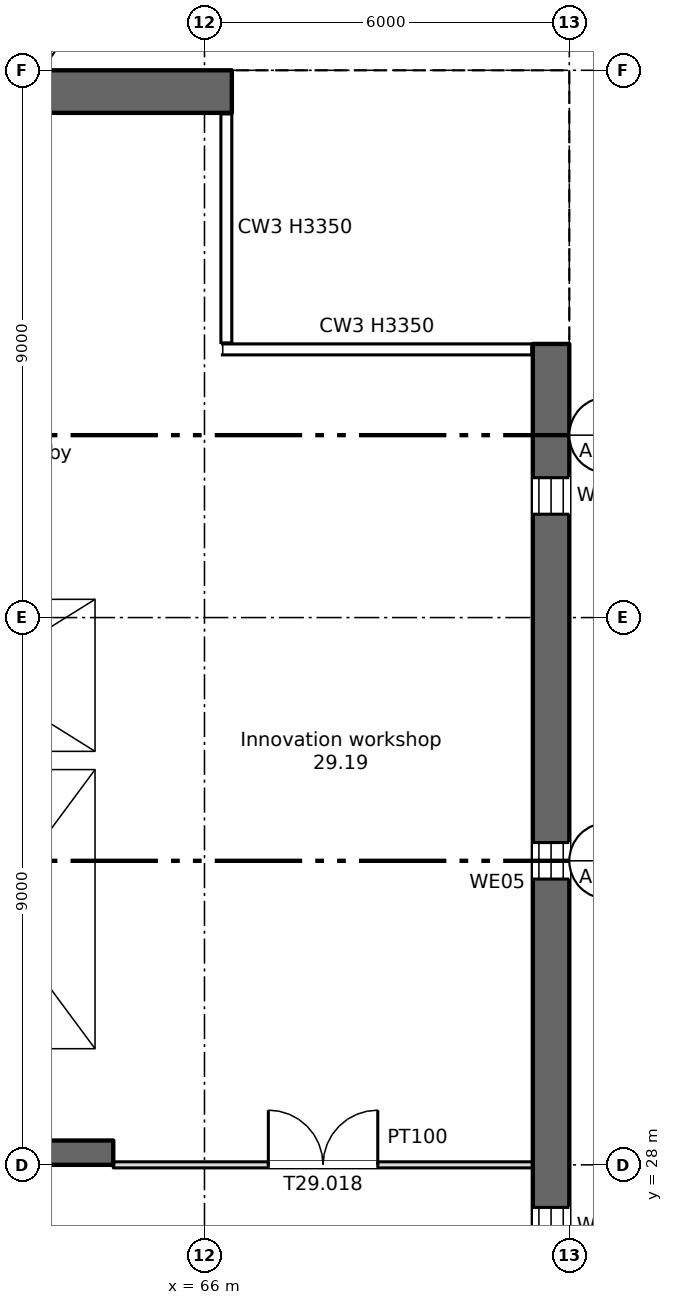
"""IFC4 building model, lengths in metres.
Left out: names, types, materials, properties, quantities, classifications, styles, units other than length and angle.
Written with IfcOpenShell. Run it as: python <this file> out.ifc"""

import sys

from ifc_helpers import new_model, si_unit, direction, frame, frame_2d, origin, place, context, subcontext, project, spatial, rectangle, extrude, element, fill, save


model = new_model("IFC4")
c1 = context("Model", 3, precision=1e-05, world=origin(), true_north=direction((0.0, 1.0)))
c2 = subcontext(c1, "Body", "Model", "MODEL_VIEW")
j1 = project(units=[si_unit("LENGTHUNIT", "METRE"), si_unit("PLANEANGLEUNIT", "RADIAN")], contexts=[c1])
p1 = place(None, origin())
s1 = spatial("IfcSite", under=j1, at=p1, CompositionType="ELEMENT")
p2 = place(p1, origin())
s2 = spatial("IfcBuilding", under=s1, at=p2, CompositionType="ELEMENT")
p3 = place(p2, frame((0.0, 0.0, 200.5)))
s3 = spatial("IfcBuildingStorey", under=s2, at=p3, CompositionType="ELEMENT", Elevation=200.5)
p4 = place(p3, frame((71.7, 7.5, 0.0), z_axis=(0.0, 0.0, 1.0), x_axis=(0.0, 1.0, 0.0)))
e1 = element("IfcWall", 1, at=p4, inside=s3, PredefinedType="SHEAR", context=c2, shape_type="SweptSolid", body=[
    extrude(rectangle(XDim=34.0, YDim=0.6, at=frame_2d((17.0, 0.0))), origin(), (0.0, 0.0, 1.0), 3.35),
])
p5 = place(p4, frame((1.2, 0.0, 0.6)))
e2 = element("IfcOpeningElement", 2, at=p5, cuts=e1, PredefinedType="OPENING", context=c2, shape_type="SweptSolid", body=[
    extrude(rectangle(XDim=0.6, YDim=2.4, at=frame_2d((0.3, 1.2))), frame((0.0, 0.31, 0.0), z_axis=(0.0, -1.0, 0.0), x_axis=(1.0, 0.0, 0.0)), (0.0, 0.0, 1.0), 0.62),
])
p6 = place(p4, frame((19.2, 0.0, 0.6)))
e3 = element("IfcOpeningElement", 3, at=p6, cuts=e1, PredefinedType="OPENING", context=c2, shape_type="SweptSolid", body=[
    extrude(rectangle(XDim=0.6, YDim=2.4, at=frame_2d((0.3, 1.2))), frame((0.0, 0.31, 0.0), z_axis=(0.0, -1.0, 0.0), x_axis=(1.0, 0.0, 0.0)), (0.0, 0.0, 1.0), 0.62),
])
p7 = place(p4, frame((25.2, 0.0, 0.6)))
e4 = element("IfcOpeningElement", 4, at=p7, cuts=e1, PredefinedType="OPENING", context=c2, shape_type="SweptSolid", body=[
    extrude(rectangle(XDim=0.6, YDim=2.4, at=frame_2d((0.3, 1.2))), frame((0.0, 0.31, 0.0), z_axis=(0.0, -1.0, 0.0), x_axis=(1.0, 0.0, 0.0)), (0.0, 0.0, 1.0), 0.62),
])
p8 = place(p4, frame((31.2, 0.0, 0.6)))
e5 = element("IfcOpeningElement", 5, at=p8, cuts=e1, PredefinedType="OPENING", context=c2, shape_type="SweptSolid", body=[
    extrude(rectangle(XDim=0.6, YDim=2.4, at=frame_2d((0.3, 1.2))), frame((0.0, 0.31, 0.0), z_axis=(0.0, -1.0, 0.0), x_axis=(1.0, 0.0, 0.0)), (0.0, 0.0, 1.0), 0.62),
])
p9 = place(p3, frame((11.55, 45.65, 0.0), z_axis=(0.0, 0.0, 1.0), x_axis=(1.0, 0.0, 0.0)))
e6 = element("IfcWall", 6, at=p9, inside=s3, PredefinedType="SHEAR", context=c2, shape_type="SweptSolid", body=[
    extrude(rectangle(XDim=54.9, YDim=0.7, at=frame_2d((27.45, 0.0))), origin(), (0.0, 0.0, 1.0), 3.35),
])
p10 = place(p9, frame((1.2, 0.0, 0.6)))
e7 = element("IfcOpeningElement", 7, at=p10, cuts=e6, PredefinedType="OPENING", context=c2, shape_type="SweptSolid", body=[
    extrude(rectangle(XDim=0.6, YDim=2.4, at=frame_2d((0.3, 1.2))), frame((0.0, 0.36, 0.0), z_axis=(0.0, -1.0, 0.0), x_axis=(1.0, 0.0, 0.0)), (0.0, 0.0, 1.0), 0.72),
])
p11 = place(p3, frame((6.6, 28.2, 0.0), z_axis=(0.0, 0.0, 1.0), x_axis=(1.0, 0.0, 0.0)))
e8 = element("IfcWall", 8, at=p11, inside=s3, PredefinedType="SHEAR", context=c2, shape_type="SweptSolid", body=[
    extrude(rectangle(XDim=57.9, YDim=0.4, at=frame_2d((28.95, 0.0))), origin(), (0.0, 0.0, 1.0), 3.35),
])
p12 = place(p11, frame((13.95, 0.0, 0.0)))
e9 = element("IfcOpeningElement", 9, at=p12, cuts=e8, PredefinedType="OPENING", context=c2, shape_type="SweptSolid", body=[
    extrude(rectangle(XDim=0.9, YDim=2.1, at=frame_2d((0.45, 1.05))), frame((0.0, 0.21, 0.0), z_axis=(0.0, -1.0, 0.0), x_axis=(1.0, 0.0, 0.0)), (0.0, 0.0, 1.0), 0.42),
])
p13 = place(p11, frame((48.663, 0.0, 0.0)))
e10 = element("IfcOpeningElement", 10, at=p13, cuts=e8, PredefinedType="OPENING", context=c2, shape_type="SweptSolid", body=[
    extrude(rectangle(XDim=0.9, YDim=2.1, at=frame_2d((0.45, 1.05))), frame((0.0, 0.21, 0.0), z_axis=(0.0, -1.0, 0.0), x_axis=(1.0, 0.0, 0.0)), (0.0, 0.0, 1.0), 0.42),
])
p14 = place(p11, frame((51.238, 0.0, 0.0)))
e11 = element("IfcOpeningElement", 11, at=p14, cuts=e8, PredefinedType="OPENING", context=c2, shape_type="SweptSolid", body=[
    extrude(rectangle(XDim=0.9, YDim=2.1, at=frame_2d((0.45, 1.05))), frame((0.0, 0.21, 0.0), z_axis=(0.0, -1.0, 0.0), x_axis=(1.0, 0.0, 0.0)), (0.0, 0.0, 1.0), 0.42),
])
p15 = place(p11, frame((1.45, 0.0, 0.0)))
e12 = element("IfcOpeningElement", 12, at=p15, cuts=e8, PredefinedType="OPENING", context=c2, shape_type="SweptSolid", body=[
    extrude(rectangle(XDim=0.9, YDim=2.1, at=frame_2d((0.45, 1.05))), frame((0.0, 0.21, 0.0), z_axis=(0.0, -1.0, 0.0), x_axis=(1.0, 0.0, 0.0)), (0.0, 0.0, 1.0), 0.42),
])
p16 = place(p11, frame((4.8, 0.0, 0.0)))
e13 = element("IfcOpeningElement", 13, at=p16, cuts=e8, PredefinedType="OPENING", context=c2, shape_type="SweptSolid", body=[
    extrude(rectangle(XDim=1.2, YDim=2.1, at=frame_2d((0.6, 1.05))), frame((0.0, 0.21, 0.0), z_axis=(0.0, -1.0, 0.0), x_axis=(1.0, 0.0, 0.0)), (0.0, 0.0, 1.0), 0.42),
])
p17 = place(p11, frame((31.8, 0.0, 0.0)))
e14 = element("IfcOpeningElement", 14, at=p17, cuts=e8, PredefinedType="OPENING", context=c2, shape_type="SweptSolid", body=[
    extrude(rectangle(XDim=1.2, YDim=2.1, at=frame_2d((0.6, 1.05))), frame((0.0, 0.21, 0.0), z_axis=(0.0, -1.0, 0.0), x_axis=(1.0, 0.0, 0.0)), (0.0, 0.0, 1.0), 0.42),
])
p18 = place(p11, frame((55.3, 0.0, 0.0)))
e15 = element("IfcOpeningElement", 15, at=p18, cuts=e8, PredefinedType="OPENING", context=c2, shape_type="SweptSolid", body=[
    extrude(rectangle(XDim=1.2, YDim=2.1, at=frame_2d((0.6, 1.05))), frame((0.0, 0.21, 0.0), z_axis=(0.0, -1.0, 0.0), x_axis=(1.0, 0.0, 0.0)), (0.0, 0.0, 1.0), 0.42),
])
p19 = place(p11, frame((21.8, 0.0, 0.0)))
e16 = element("IfcOpeningElement", 16, at=p19, cuts=e8, PredefinedType="OPENING", context=c2, shape_type="SweptSolid", body=[
    extrude(rectangle(XDim=1.2, YDim=2.1, at=frame_2d((0.6, 1.05))), frame((0.0, 0.21, 0.0), z_axis=(0.0, -1.0, 0.0), x_axis=(1.0, 0.0, 0.0)), (0.0, 0.0, 1.0), 0.42),
])
p20 = place(p11, frame((41.8, 0.0, 0.0)))
e17 = element("IfcOpeningElement", 17, at=p20, cuts=e8, PredefinedType="OPENING", context=c2, shape_type="SweptSolid", body=[
    extrude(rectangle(XDim=1.2, YDim=2.1, at=frame_2d((0.6, 1.05))), frame((0.0, 0.21, 0.0), z_axis=(0.0, -1.0, 0.0), x_axis=(1.0, 0.0, 0.0)), (0.0, 0.0, 1.0), 0.42),
])
p21 = place(p11, frame((24.95, 0.0, 0.0)))
e18 = element("IfcOpeningElement", 18, at=p21, cuts=e8, PredefinedType="OPENING", context=c2, shape_type="SweptSolid", body=[
    extrude(rectangle(XDim=2.4, YDim=2.1, at=frame_2d((1.2, 1.05))), frame((0.0, 0.21, 0.0), z_axis=(0.0, -1.0, 0.0), x_axis=(1.0, 0.0, 0.0)), (0.0, 0.0, 1.0), 0.42),
])
p22 = place(p11, frame((37.45, 0.0, 0.0)))
e19 = element("IfcOpeningElement", 19, at=p22, cuts=e8, PredefinedType="OPENING", context=c2, shape_type="SweptSolid", body=[
    extrude(rectangle(XDim=2.4, YDim=2.1, at=frame_2d((1.2, 1.05))), frame((0.0, 0.21, 0.0), z_axis=(0.0, -1.0, 0.0), x_axis=(1.0, 0.0, 0.0)), (0.0, 0.0, 1.0), 0.42),
])
p23 = place(p11, frame((8.1, 0.0, 0.0)))
e20 = element("IfcOpeningElement", 20, at=p23, cuts=e8, PredefinedType="OPENING", context=c2, shape_type="SweptSolid", body=[
    extrude(rectangle(XDim=2.4, YDim=2.1, at=frame_2d((1.2, 1.05))), frame((0.0, 0.21, 0.0), z_axis=(0.0, -1.0, 0.0), x_axis=(1.0, 0.0, 0.0)), (0.0, 0.0, 1.0), 0.42),
])
p24 = place(p11, frame((28.95, 0.0, 0.0)))
e21 = element("IfcOpeningElement", 21, at=p24, cuts=e8, PredefinedType="OPENING", context=c2, shape_type="SweptSolid", body=[
    extrude(rectangle(XDim=0.9, YDim=2.1, at=frame_2d((0.45, 1.05))), frame((0.0, 0.21, 0.0), z_axis=(0.0, -1.0, 0.0), x_axis=(1.0, 0.0, 0.0)), (0.0, 0.0, 1.0), 0.42),
])
p25 = place(p11, frame((34.95, 0.0, 0.0)))
e22 = element("IfcOpeningElement", 22, at=p25, cuts=e8, PredefinedType="OPENING", context=c2, shape_type="SweptSolid", body=[
    extrude(rectangle(XDim=0.9, YDim=2.1, at=frame_2d((0.45, 1.05))), frame((0.0, 0.21, 0.0), z_axis=(0.0, -1.0, 0.0), x_axis=(1.0, 0.0, 0.0)), (0.0, 0.0, 1.0), 0.42),
])
p26 = place(p3, frame((64.35, 34.8, 0.0), z_axis=(0.0, 0.0, 1.0), x_axis=(0.0, 1.0, 0.0)))
e23 = element("IfcWall", 23, at=p26, inside=s3, PredefinedType="SHEAR", context=c2, shape_type="SweptSolid", body=[
    extrude(rectangle(XDim=10.5, YDim=0.3, at=frame_2d((5.25, 0.0))), origin(), (0.0, 0.0, 1.0), 3.35),
])
p27 = place(p3, frame((64.35, 28.4, 0.0), z_axis=(0.0, 0.0, 1.0), x_axis=(0.0, 1.0, 0.0)))
e24 = element("IfcWall", 24, at=p27, inside=s3, PredefinedType="SHEAR", context=c2, shape_type="SweptSolid", body=[
    extrude(rectangle(XDim=6.1, YDim=0.3, at=frame_2d((3.05, 0.0))), origin(), (0.0, 0.0, 1.0), 3.35),
])
p28 = place(p3, frame((60.2, 34.65, 0.0), z_axis=(0.0, 0.0, 1.0), x_axis=(1.0, 0.0, 0.0)))
e25 = element("IfcWall", 25, at=p28, inside=s3, PredefinedType="SHEAR", context=c2, shape_type="SweptSolid", body=[
    extrude(rectangle(XDim=4.3, YDim=0.3, at=frame_2d((2.15, 0.0))), origin(), (0.0, 0.0, 1.0), 3.35),
])
p29 = place(p3, frame((60.2, 37.45, 0.0), z_axis=(0.0, 0.0, 1.0), x_axis=(1.0, 0.0, 0.0)))
e26 = element("IfcWall", 26, at=p29, inside=s3, PredefinedType="SHEAR", context=c2, shape_type="SweptSolid", body=[
    extrude(rectangle(XDim=4.0, YDim=0.3, at=frame_2d((2.0, 0.0))), origin(), (0.0, 0.0, 1.0), 3.35),
])
p30 = place(p29, frame((1.45, 0.0, 0.0)))
e27 = element("IfcOpeningElement", 27, at=p30, cuts=e26, PredefinedType="OPENING", context=c2, shape_type="SweptSolid", body=[
    extrude(rectangle(XDim=1.1, YDim=2.1, at=frame_2d((0.55, 1.05))), frame((0.0, 0.16, 0.0), z_axis=(0.0, -1.0, 0.0), x_axis=(1.0, 0.0, 0.0)), (0.0, 0.0, 1.0), 0.32),
])
p31 = place(p3, frame((64.5, 28.0, 0.0), z_axis=(0.0, 0.0, 1.0), x_axis=(1.0, 0.0, 0.0)))
e28 = element("IfcWall", 28, at=p31, inside=s3, PredefinedType="PARTITIONING", context=c2, shape_type="SweptSolid", body=[
    extrude(rectangle(XDim=6.9, YDim=0.1, at=frame_2d((3.45, 0.0))), origin(), (0.0, 0.0, 1.0), 3.35),
])
p32 = place(p31, frame((2.55, 0.0, 0.0)))
e29 = element("IfcOpeningElement", 29, at=p32, cuts=e28, PredefinedType="OPENING", context=c2, shape_type="SweptSolid", body=[
    extrude(rectangle(XDim=1.8, YDim=2.1, at=frame_2d((0.9, 1.05))), frame((0.0, 0.06, 0.0), z_axis=(0.0, -1.0, 0.0), x_axis=(1.0, 0.0, 0.0)), (0.0, 0.0, 1.0), 0.12),
])
p33 = place(p6, origin())
e30 = element("IfcWindow", 30, at=p33, inside=s3, PartitioningType="SINGLE_PANEL", PredefinedType="WINDOW", context=c2, shape_type="SweptSolid", body=[
    extrude(rectangle(XDim=0.6, YDim=2.4, at=frame_2d((0.3, 1.2))), frame((0.0, 0.03, 0.0), z_axis=(0.0, -1.0, 0.0), x_axis=(1.0, 0.0, 0.0)), (0.0, 0.0, 1.0), 0.06),
])
fill(e3, e30)
p34 = place(p7, origin())
e31 = element("IfcWindow", 31, at=p34, inside=s3, PartitioningType="SINGLE_PANEL", PredefinedType="WINDOW", context=c2, shape_type="SweptSolid", body=[
    extrude(rectangle(XDim=0.6, YDim=2.4, at=frame_2d((0.3, 1.2))), frame((0.0, 0.03, 0.0), z_axis=(0.0, -1.0, 0.0), x_axis=(1.0, 0.0, 0.0)), (0.0, 0.0, 1.0), 0.06),
])
fill(e4, e31)
p35 = place(p8, origin())
e32 = element("IfcWindow", 32, at=p35, inside=s3, PartitioningType="SINGLE_PANEL", PredefinedType="WINDOW", context=c2, shape_type="SweptSolid", body=[
    extrude(rectangle(XDim=0.6, YDim=2.4, at=frame_2d((0.3, 1.2))), frame((0.0, 0.03, 0.0), z_axis=(0.0, -1.0, 0.0), x_axis=(1.0, 0.0, 0.0)), (0.0, 0.0, 1.0), 0.06),
])
fill(e5, e32)
p36 = place(p32, origin())
e33 = element("IfcDoor", 33, at=p36, inside=s3, OperationType="DOUBLE_DOOR_SINGLE_SWING", PredefinedType="DOOR", context=c2, shape_type="SweptSolid", body=[
    extrude(rectangle(XDim=1.8, YDim=2.1, at=frame_2d((0.9, 1.05))), frame((0.0, 0.025, 0.0), z_axis=(0.0, -1.0, 0.0), x_axis=(1.0, 0.0, 0.0)), (0.0, 0.0, 1.0), 0.05),
])
fill(e29, e33)
save(model, sys.argv[1])
